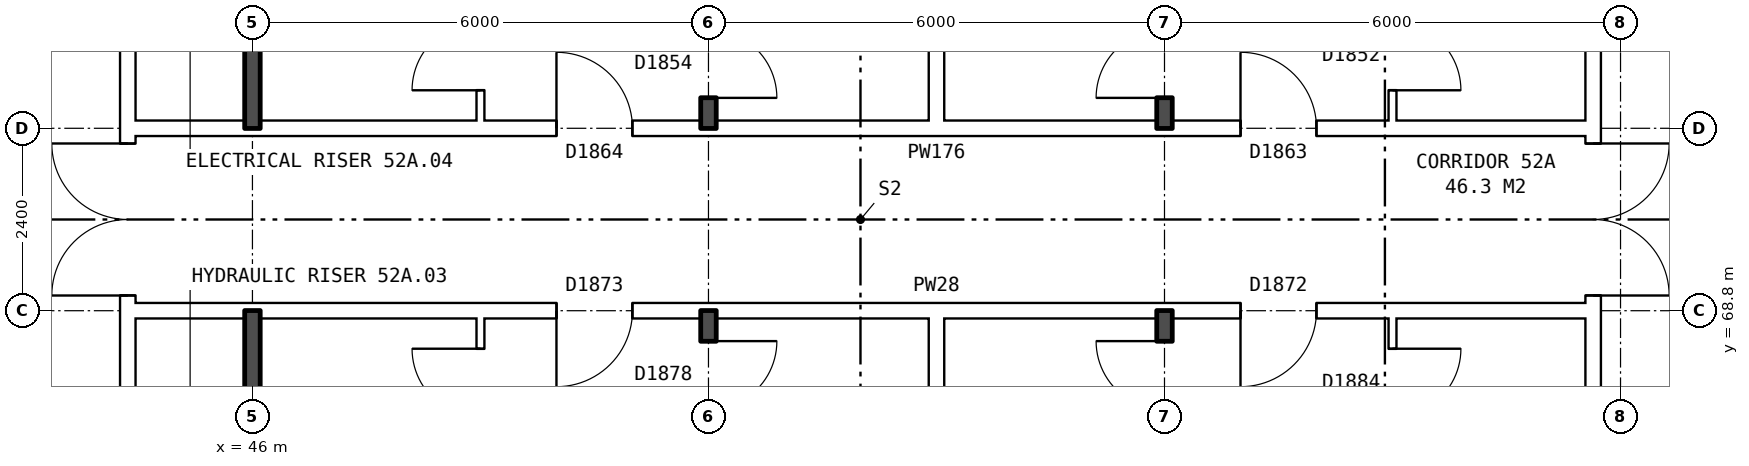
"""IFC4 building model, lengths in metres.
Left out: names, types, materials, properties, quantities, classifications, styles, units other than length and angle.
Written with IfcOpenShell. Run it as: python <this file> out.ifc"""

import sys

from ifc_helpers import new_model, si_unit, direction, frame, frame_2d, origin, place, context, subcontext, project, spatial, rectangle, extrude, element, fill, save


model = new_model("IFC4")
c1 = context("Model", 3, precision=1e-05, world=origin(), true_north=direction((0.0, 1.0)))
c2 = subcontext(c1, "Body", "Model", "MODEL_VIEW")
j1 = project(units=[si_unit("LENGTHUNIT", "METRE"), si_unit("PLANEANGLEUNIT", "RADIAN")], contexts=[c1])
p1 = place(None, origin())
s1 = spatial("IfcSite", under=j1, at=p1, CompositionType="ELEMENT")
p2 = place(p1, origin())
s2 = spatial("IfcBuilding", under=s1, at=p2, CompositionType="ELEMENT")
p3 = place(p2, frame((0.0, 0.0, 185.1)))
s3 = spatial("IfcBuildingStorey", under=s2, at=p3, CompositionType="ELEMENT", Elevation=185.1)
p4 = place(p3, frame((63.64, 63.9, 0.0), z_axis=(0.0, 0.0, 1.0), x_axis=(0.0, 1.0, 0.0)))
e1 = element("IfcWall", 1, at=p4, inside=s3, PredefinedType="PARTITIONING", context=c2, shape_type="SweptSolid", body=[
    extrude(rectangle(XDim=12.2, YDim=0.2, at=frame_2d((6.1, 0.0))), origin(), (0.0, 0.0, 1.0), 2.85),
])
p5 = place(p4, frame((5.1, 0.0, 0.0)))
e2 = element("IfcOpeningElement", 2, at=p5, cuts=e1, PredefinedType="OPENING", context=c2, shape_type="SweptSolid", body=[
    extrude(rectangle(XDim=2.0, YDim=2.1, at=frame_2d((1.0, 1.05))), frame((0.0, 0.11, 0.0), z_axis=(0.0, -1.0, 0.0), x_axis=(1.0, 0.0, 0.0)), (0.0, 0.0, 1.0), 0.22),
])
p6 = place(p3, frame((44.36, 63.9, 0.0), z_axis=(0.0, 0.0, 1.0), x_axis=(0.0, 1.0, 0.0)))
e3 = element("IfcWall", 3, at=p6, inside=s3, PredefinedType="PARTITIONING", context=c2, shape_type="SweptSolid", body=[
    extrude(rectangle(XDim=12.2, YDim=0.2, at=frame_2d((6.1, 0.0))), origin(), (0.0, 0.0, 1.0), 2.85),
])
p7 = place(p6, frame((5.1, 0.0, 0.0)))
e4 = element("IfcOpeningElement", 4, at=p7, cuts=e3, PredefinedType="OPENING", context=c2, shape_type="SweptSolid", body=[
    extrude(rectangle(XDim=2.0, YDim=2.1, at=frame_2d((1.0, 1.05))), frame((0.0, 0.11, 0.0), z_axis=(0.0, -1.0, 0.0), x_axis=(1.0, 0.0, 0.0)), (0.0, 0.0, 1.0), 0.22),
])
p8 = place(p3, frame((44.36, 68.8, 0.0), z_axis=(0.0, 0.0, 1.0), x_axis=(1.0, 0.0, 0.0)))
e5 = element("IfcWall", 5, at=p8, inside=s3, PredefinedType="PARTITIONING", context=c2, shape_type="SweptSolid", body=[
    extrude(rectangle(XDim=19.28, YDim=0.2, at=frame_2d((9.64, 0.0))), origin(), (0.0, 0.0, 1.0), 2.85),
])
p9 = place(p8, frame((14.64, 0.0, 0.0)))
e6 = element("IfcOpeningElement", 6, at=p9, cuts=e5, PredefinedType="OPENING", context=c2, shape_type="SweptSolid", body=[
    extrude(rectangle(XDim=1.0, YDim=2.1, at=frame_2d((0.5, 1.05))), frame((0.0, 0.11, 0.0), z_axis=(0.0, -1.0, 0.0), x_axis=(1.0, 0.0, 0.0)), (0.0, 0.0, 1.0), 0.22),
])
p10 = place(p8, frame((5.64, 0.0, 0.0)))
e7 = element("IfcOpeningElement", 7, at=p10, cuts=e5, PredefinedType="OPENING", context=c2, shape_type="SweptSolid", body=[
    extrude(rectangle(XDim=1.0, YDim=2.1, at=frame_2d((0.5, 1.05))), frame((0.0, 0.11, 0.0), z_axis=(0.0, -1.0, 0.0), x_axis=(1.0, 0.0, 0.0)), (0.0, 0.0, 1.0), 0.22),
])
p11 = place(p3, frame((44.36, 71.2, 0.0), z_axis=(0.0, 0.0, 1.0), x_axis=(1.0, 0.0, 0.0)))
e8 = element("IfcWall", 8, at=p11, inside=s3, PredefinedType="PARTITIONING", context=c2, shape_type="SweptSolid", body=[
    extrude(rectangle(XDim=19.28, YDim=0.2, at=frame_2d((9.64, 0.0))), origin(), (0.0, 0.0, 1.0), 2.85),
])
p12 = place(p11, frame((14.64, 0.0, 0.0)))
e9 = element("IfcOpeningElement", 9, at=p12, cuts=e8, PredefinedType="OPENING", context=c2, shape_type="SweptSolid", body=[
    extrude(rectangle(XDim=1.0, YDim=2.1, at=frame_2d((0.5, 1.05))), frame((0.0, 0.11, 0.0), z_axis=(0.0, -1.0, 0.0), x_axis=(1.0, 0.0, 0.0)), (0.0, 0.0, 1.0), 0.22),
])
p13 = place(p11, frame((5.64, 0.0, 0.0)))
e10 = element("IfcOpeningElement", 10, at=p13, cuts=e8, PredefinedType="OPENING", context=c2, shape_type="SweptSolid", body=[
    extrude(rectangle(XDim=1.0, YDim=2.1, at=frame_2d((0.5, 1.05))), frame((0.0, 0.11, 0.0), z_axis=(0.0, -1.0, 0.0), x_axis=(1.0, 0.0, 0.0)), (0.0, 0.0, 1.0), 0.22),
])
for number, where, z_axis, x_axis in (
    (11, (46.0, 63.8, 0.0), (0.0, 0.0, 1.0), (0.0, 1.0, 0.0)),
    (12, (46.0, 71.2, 0.0), (0.0, 0.0, 1.0), (0.0, 1.0, 0.0)),
):
    element("IfcWall", number, at=place(p3, frame(where, z_axis=z_axis, x_axis=x_axis)), inside=s3, PredefinedType="SOLIDWALL", context=c2, shape_type="SweptSolid", body=[
        extrude(rectangle(XDim=5.0, YDim=0.2, at=frame_2d((2.5, 0.0))), origin(), (0.0, 0.0, 1.0), 2.85),
    ])
p14 = place(p3, frame((49.0, 54.36, 0.0), z_axis=(0.0, 0.0, 1.0), x_axis=(0.0, 1.0, 0.0)))
e13 = element("IfcWall", 13, at=p14, inside=s3, PredefinedType="PARTITIONING", context=c2, shape_type="SweptSolid", body=[
    extrude(rectangle(XDim=14.34, YDim=0.1, at=frame_2d((7.17, 0.0))), origin(), (0.0, 0.0, 1.0), 2.85),
])
p15 = place(p14, frame((5.5, 0.0, 0.0)))
e14 = element("IfcOpeningElement", 14, at=p15, cuts=e13, PredefinedType="OPENING", context=c2, shape_type="SweptSolid", body=[
    extrude(rectangle(XDim=0.9, YDim=2.1, at=frame_2d((0.45, 1.05))), frame((0.0, 0.06, 0.0), z_axis=(0.0, -1.0, 0.0), x_axis=(1.0, 0.0, 0.0)), (0.0, 0.0, 1.0), 0.12),
])
p16 = place(p14, frame((13.04, 0.0, 0.0)))
e15 = element("IfcOpeningElement", 15, at=p16, cuts=e13, PredefinedType="OPENING", context=c2, shape_type="SweptSolid", body=[
    extrude(rectangle(XDim=0.9, YDim=2.1, at=frame_2d((0.45, 1.05))), frame((0.0, 0.06, 0.0), z_axis=(0.0, -1.0, 0.0), x_axis=(1.0, 0.0, 0.0)), (0.0, 0.0, 1.0), 0.12),
])
p17 = place(p3, frame((49.0, 71.3, 0.0), z_axis=(0.0, 0.0, 1.0), x_axis=(0.0, 1.0, 0.0)))
e16 = element("IfcWall", 16, at=p17, inside=s3, PredefinedType="PARTITIONING", context=c2, shape_type="SweptSolid", body=[
    extrude(rectangle(XDim=14.34, YDim=0.1, at=frame_2d((7.17, 0.0))), origin(), (0.0, 0.0, 1.0), 2.85),
])
p18 = place(p17, frame((5.74, 0.0, 0.0)))
e17 = element("IfcOpeningElement", 17, at=p18, cuts=e16, PredefinedType="OPENING", context=c2, shape_type="SweptSolid", body=[
    extrude(rectangle(XDim=0.9, YDim=2.1, at=frame_2d((0.45, 1.05))), frame((0.0, 0.06, 0.0), z_axis=(0.0, -1.0, 0.0), x_axis=(1.0, 0.0, 0.0)), (0.0, 0.0, 1.0), 0.12),
])
p19 = place(p17, frame((0.4, 0.0, 0.0)))
e18 = element("IfcOpeningElement", 18, at=p19, cuts=e16, PredefinedType="OPENING", context=c2, shape_type="SweptSolid", body=[
    extrude(rectangle(XDim=0.9, YDim=2.1, at=frame_2d((0.45, 1.05))), frame((0.0, 0.06, 0.0), z_axis=(0.0, -1.0, 0.0), x_axis=(1.0, 0.0, 0.0)), (0.0, 0.0, 1.0), 0.12),
])
p20 = place(p3, frame((52.0, 54.36, 0.0), z_axis=(0.0, 0.0, 1.0), x_axis=(0.0, 1.0, 0.0)))
e19 = element("IfcWall", 19, at=p20, inside=s3, PredefinedType="SOLIDWALL", context=c2, shape_type="SweptSolid", body=[
    extrude(rectangle(XDim=14.44, YDim=0.2, at=frame_2d((7.22, 0.0))), origin(), (0.0, 0.0, 1.0), 2.85),
])
p21 = place(p20, frame((5.5, 0.0, 0.0)))
e20 = element("IfcOpeningElement", 20, at=p21, cuts=e19, PredefinedType="OPENING", context=c2, shape_type="SweptSolid", body=[
    extrude(rectangle(XDim=0.9, YDim=2.1, at=frame_2d((0.45, 1.05))), frame((0.0, 0.11, 0.0), z_axis=(0.0, -1.0, 0.0), x_axis=(1.0, 0.0, 0.0)), (0.0, 0.0, 1.0), 0.22),
])
p22 = place(p20, frame((13.14, 0.0, 0.0)))
e21 = element("IfcOpeningElement", 21, at=p22, cuts=e19, PredefinedType="OPENING", context=c2, shape_type="SweptSolid", body=[
    extrude(rectangle(XDim=0.9, YDim=2.1, at=frame_2d((0.45, 1.05))), frame((0.0, 0.11, 0.0), z_axis=(0.0, -1.0, 0.0), x_axis=(1.0, 0.0, 0.0)), (0.0, 0.0, 1.0), 0.22),
])
p23 = place(p3, frame((52.0, 71.2, 0.0), z_axis=(0.0, 0.0, 1.0), x_axis=(0.0, 1.0, 0.0)))
e22 = element("IfcWall", 22, at=p23, inside=s3, PredefinedType="SOLIDWALL", context=c2, shape_type="SweptSolid", body=[
    extrude(rectangle(XDim=14.44, YDim=0.2, at=frame_2d((7.22, 0.0))), origin(), (0.0, 0.0, 1.0), 2.85),
])
p24 = place(p23, frame((5.84, 0.0, 0.0)))
e23 = element("IfcOpeningElement", 23, at=p24, cuts=e22, PredefinedType="OPENING", context=c2, shape_type="SweptSolid", body=[
    extrude(rectangle(XDim=0.9, YDim=2.1, at=frame_2d((0.45, 1.05))), frame((0.0, 0.11, 0.0), z_axis=(0.0, -1.0, 0.0), x_axis=(1.0, 0.0, 0.0)), (0.0, 0.0, 1.0), 0.22),
])
p25 = place(p23, frame((0.4, 0.0, 0.0)))
e24 = element("IfcOpeningElement", 24, at=p25, cuts=e22, PredefinedType="OPENING", context=c2, shape_type="SweptSolid", body=[
    extrude(rectangle(XDim=0.9, YDim=2.1, at=frame_2d((0.45, 1.05))), frame((0.0, 0.11, 0.0), z_axis=(0.0, -1.0, 0.0), x_axis=(1.0, 0.0, 0.0)), (0.0, 0.0, 1.0), 0.22),
])
for number, where, z_axis, x_axis in (
    (25, (55.0, 54.36, 0.0), (0.0, 0.0, 1.0), (0.0, 1.0, 0.0)),
    (26, (55.0, 71.3, 0.0), (0.0, 0.0, 1.0), (0.0, 1.0, 0.0)),
):
    element("IfcWall", number, at=place(p3, frame(where, z_axis=z_axis, x_axis=x_axis)), inside=s3, PredefinedType="PARTITIONING", context=c2, shape_type="SweptSolid", body=[
        extrude(rectangle(XDim=14.34, YDim=0.2, at=frame_2d((7.17, 0.0))), origin(), (0.0, 0.0, 1.0), 2.85),
    ])
p26 = place(p3, frame((58.0, 54.36, 0.0), z_axis=(0.0, 0.0, 1.0), x_axis=(0.0, 1.0, 0.0)))
e27 = element("IfcWall", 27, at=p26, inside=s3, PredefinedType="SOLIDWALL", context=c2, shape_type="SweptSolid", body=[
    extrude(rectangle(XDim=14.44, YDim=0.2, at=frame_2d((7.22, 0.0))), origin(), (0.0, 0.0, 1.0), 2.85),
])
p27 = place(p26, frame((5.5, 0.0, 0.0)))
e28 = element("IfcOpeningElement", 28, at=p27, cuts=e27, PredefinedType="OPENING", context=c2, shape_type="SweptSolid", body=[
    extrude(rectangle(XDim=0.9, YDim=2.1, at=frame_2d((0.45, 1.05))), frame((0.0, 0.11, 0.0), z_axis=(0.0, -1.0, 0.0), x_axis=(1.0, 0.0, 0.0)), (0.0, 0.0, 1.0), 0.22),
])
p28 = place(p26, frame((13.14, 0.0, 0.0)))
e29 = element("IfcOpeningElement", 29, at=p28, cuts=e27, PredefinedType="OPENING", context=c2, shape_type="SweptSolid", body=[
    extrude(rectangle(XDim=0.9, YDim=2.1, at=frame_2d((0.45, 1.05))), frame((0.0, 0.11, 0.0), z_axis=(0.0, -1.0, 0.0), x_axis=(1.0, 0.0, 0.0)), (0.0, 0.0, 1.0), 0.22),
])
p29 = place(p3, frame((58.0, 71.2, 0.0), z_axis=(0.0, 0.0, 1.0), x_axis=(0.0, 1.0, 0.0)))
e30 = element("IfcWall", 30, at=p29, inside=s3, PredefinedType="SOLIDWALL", context=c2, shape_type="SweptSolid", body=[
    extrude(rectangle(XDim=14.44, YDim=0.2, at=frame_2d((7.22, 0.0))), origin(), (0.0, 0.0, 1.0), 2.85),
])
p30 = place(p29, frame((9.34, 0.0, 0.0)))
e31 = element("IfcOpeningElement", 31, at=p30, cuts=e30, PredefinedType="OPENING", context=c2, shape_type="SweptSolid", body=[
    extrude(rectangle(XDim=0.9, YDim=2.1, at=frame_2d((0.45, 1.05))), frame((0.0, 0.11, 0.0), z_axis=(0.0, -1.0, 0.0), x_axis=(1.0, 0.0, 0.0)), (0.0, 0.0, 1.0), 0.22),
])
p31 = place(p29, frame((0.4, 0.0, 0.0)))
e32 = element("IfcOpeningElement", 32, at=p31, cuts=e30, PredefinedType="OPENING", context=c2, shape_type="SweptSolid", body=[
    extrude(rectangle(XDim=0.9, YDim=2.1, at=frame_2d((0.45, 1.05))), frame((0.0, 0.11, 0.0), z_axis=(0.0, -1.0, 0.0), x_axis=(1.0, 0.0, 0.0)), (0.0, 0.0, 1.0), 0.22),
])
p32 = place(p3, frame((61.0, 54.36, 0.0), z_axis=(0.0, 0.0, 1.0), x_axis=(0.0, 1.0, 0.0)))
e33 = element("IfcWall", 33, at=p32, inside=s3, PredefinedType="PARTITIONING", context=c2, shape_type="SweptSolid", body=[
    extrude(rectangle(XDim=14.34, YDim=0.1, at=frame_2d((7.17, 0.0))), origin(), (0.0, 0.0, 1.0), 2.85),
])
p33 = place(p32, frame((5.5, 0.0, 0.0)))
e34 = element("IfcOpeningElement", 34, at=p33, cuts=e33, PredefinedType="OPENING", context=c2, shape_type="SweptSolid", body=[
    extrude(rectangle(XDim=0.9, YDim=2.1, at=frame_2d((0.45, 1.05))), frame((0.0, 0.06, 0.0), z_axis=(0.0, -1.0, 0.0), x_axis=(1.0, 0.0, 0.0)), (0.0, 0.0, 1.0), 0.12),
])
p34 = place(p32, frame((13.04, 0.0, 0.0)))
e35 = element("IfcOpeningElement", 35, at=p34, cuts=e33, PredefinedType="OPENING", context=c2, shape_type="SweptSolid", body=[
    extrude(rectangle(XDim=0.9, YDim=2.1, at=frame_2d((0.45, 1.05))), frame((0.0, 0.06, 0.0), z_axis=(0.0, -1.0, 0.0), x_axis=(1.0, 0.0, 0.0)), (0.0, 0.0, 1.0), 0.12),
])
p35 = place(p3, frame((61.0, 71.3, 0.0), z_axis=(0.0, 0.0, 1.0), x_axis=(0.0, 1.0, 0.0)))
e36 = element("IfcWall", 36, at=p35, inside=s3, PredefinedType="PARTITIONING", context=c2, shape_type="SweptSolid", body=[
    extrude(rectangle(XDim=14.34, YDim=0.1, at=frame_2d((7.17, 0.0))), origin(), (0.0, 0.0, 1.0), 2.85),
])
p36 = place(p35, frame((9.24, 0.0, 0.0)))
e37 = element("IfcOpeningElement", 37, at=p36, cuts=e36, PredefinedType="OPENING", context=c2, shape_type="SweptSolid", body=[
    extrude(rectangle(XDim=0.9, YDim=2.1, at=frame_2d((0.45, 1.05))), frame((0.0, 0.06, 0.0), z_axis=(0.0, -1.0, 0.0), x_axis=(1.0, 0.0, 0.0)), (0.0, 0.0, 1.0), 0.12),
])
p37 = place(p35, frame((0.4, 0.0, 0.0)))
e38 = element("IfcOpeningElement", 38, at=p37, cuts=e36, PredefinedType="OPENING", context=c2, shape_type="SweptSolid", body=[
    extrude(rectangle(XDim=0.9, YDim=2.1, at=frame_2d((0.45, 1.05))), frame((0.0, 0.06, 0.0), z_axis=(0.0, -1.0, 0.0), x_axis=(1.0, 0.0, 0.0)), (0.0, 0.0, 1.0), 0.12),
])
p38 = place(p5, frame((2.0, 0.0, 0.0), z_axis=(0.0, 0.0, 1.0), x_axis=(-1.0, 0.0, 0.0)))
e39 = element("IfcDoor", 39, at=p38, inside=s3, OperationType="DOUBLE_DOOR_SINGLE_SWING", PredefinedType="DOOR", context=c2, shape_type="SweptSolid", body=[
    extrude(rectangle(XDim=2.0, YDim=2.1, at=frame_2d((1.0, 1.05))), frame((0.0, 0.025, 0.0), z_axis=(0.0, -1.0, 0.0), x_axis=(1.0, 0.0, 0.0)), (0.0, 0.0, 1.0), 0.05),
])
fill(e2, e39)
p39 = place(p7, origin())
e40 = element("IfcDoor", 40, at=p39, inside=s3, OperationType="DOUBLE_DOOR_SINGLE_SWING", PredefinedType="DOOR", context=c2, shape_type="SweptSolid", body=[
    extrude(rectangle(XDim=2.0, YDim=2.1, at=frame_2d((1.0, 1.05))), frame((0.0, 0.025, 0.0), z_axis=(0.0, -1.0, 0.0), x_axis=(1.0, 0.0, 0.0)), (0.0, 0.0, 1.0), 0.05),
])
fill(e4, e40)
p40 = place(p9, frame((1.0, 0.0, 0.0), z_axis=(0.0, 0.0, 1.0), x_axis=(-1.0, 0.0, 0.0)))
e41 = element("IfcDoor", 41, at=p40, inside=s3, OperationType="SINGLE_SWING_RIGHT", PredefinedType="DOOR", context=c2, shape_type="SweptSolid", body=[
    extrude(rectangle(XDim=1.0, YDim=2.1, at=frame_2d((0.5, 1.05))), frame((0.0, 0.025, 0.0), z_axis=(0.0, -1.0, 0.0), x_axis=(1.0, 0.0, 0.0)), (0.0, 0.0, 1.0), 0.05),
])
fill(e6, e41)
p41 = place(p34, frame((0.9, 0.0, 0.0), z_axis=(0.0, 0.0, 1.0), x_axis=(-1.0, 0.0, 0.0)))
e42 = element("IfcDoor", 42, at=p41, inside=s3, OperationType="SINGLE_SWING_LEFT", PredefinedType="DOOR", context=c2, shape_type="SweptSolid", body=[
    extrude(rectangle(XDim=0.9, YDim=2.1, at=frame_2d((0.45, 1.05))), frame((0.0, 0.025, 0.0), z_axis=(0.0, -1.0, 0.0), x_axis=(1.0, 0.0, 0.0)), (0.0, 0.0, 1.0), 0.05),
])
fill(e35, e42)
p42 = place(p28, origin())
e43 = element("IfcDoor", 43, at=p42, inside=s3, OperationType="SINGLE_SWING_RIGHT", PredefinedType="DOOR", context=c2, shape_type="SweptSolid", body=[
    extrude(rectangle(XDim=0.9, YDim=2.1, at=frame_2d((0.45, 1.05))), frame((0.0, 0.025, 0.0), z_axis=(0.0, -1.0, 0.0), x_axis=(1.0, 0.0, 0.0)), (0.0, 0.0, 1.0), 0.05),
])
fill(e29, e43)
p43 = place(p10, frame((1.0, 0.0, 0.0), z_axis=(0.0, 0.0, 1.0), x_axis=(-1.0, 0.0, 0.0)))
e44 = element("IfcDoor", 44, at=p43, inside=s3, OperationType="SINGLE_SWING_RIGHT", PredefinedType="DOOR", context=c2, shape_type="SweptSolid", body=[
    extrude(rectangle(XDim=1.0, YDim=2.1, at=frame_2d((0.5, 1.05))), frame((0.0, 0.025, 0.0), z_axis=(0.0, -1.0, 0.0), x_axis=(1.0, 0.0, 0.0)), (0.0, 0.0, 1.0), 0.05),
])
fill(e7, e44)
p44 = place(p22, frame((0.9, 0.0, 0.0), z_axis=(0.0, 0.0, 1.0), x_axis=(-1.0, 0.0, 0.0)))
e45 = element("IfcDoor", 45, at=p44, inside=s3, OperationType="SINGLE_SWING_LEFT", PredefinedType="DOOR", context=c2, shape_type="SweptSolid", body=[
    extrude(rectangle(XDim=0.9, YDim=2.1, at=frame_2d((0.45, 1.05))), frame((0.0, 0.025, 0.0), z_axis=(0.0, -1.0, 0.0), x_axis=(1.0, 0.0, 0.0)), (0.0, 0.0, 1.0), 0.05),
])
fill(e21, e45)
p45 = place(p16, origin())
e46 = element("IfcDoor", 46, at=p45, inside=s3, OperationType="SINGLE_SWING_RIGHT", PredefinedType="DOOR", context=c2, shape_type="SweptSolid", body=[
    extrude(rectangle(XDim=0.9, YDim=2.1, at=frame_2d((0.45, 1.05))), frame((0.0, 0.025, 0.0), z_axis=(0.0, -1.0, 0.0), x_axis=(1.0, 0.0, 0.0)), (0.0, 0.0, 1.0), 0.05),
])
fill(e15, e46)
p46 = place(p12, origin())
e47 = element("IfcDoor", 47, at=p46, inside=s3, OperationType="SINGLE_SWING_LEFT", PredefinedType="DOOR", context=c2, shape_type="SweptSolid", body=[
    extrude(rectangle(XDim=1.0, YDim=2.1, at=frame_2d((0.5, 1.05))), frame((0.0, 0.025, 0.0), z_axis=(0.0, -1.0, 0.0), x_axis=(1.0, 0.0, 0.0)), (0.0, 0.0, 1.0), 0.05),
])
fill(e9, e47)
p47 = place(p37, frame((0.9, 0.0, 0.0), z_axis=(0.0, 0.0, 1.0), x_axis=(-1.0, 0.0, 0.0)))
e48 = element("IfcDoor", 48, at=p47, inside=s3, OperationType="SINGLE_SWING_RIGHT", PredefinedType="DOOR", context=c2, shape_type="SweptSolid", body=[
    extrude(rectangle(XDim=0.9, YDim=2.1, at=frame_2d((0.45, 1.05))), frame((0.0, 0.025, 0.0), z_axis=(0.0, -1.0, 0.0), x_axis=(1.0, 0.0, 0.0)), (0.0, 0.0, 1.0), 0.05),
])
fill(e38, e48)
p48 = place(p31, origin())
e49 = element("IfcDoor", 49, at=p48, inside=s3, OperationType="SINGLE_SWING_LEFT", PredefinedType="DOOR", context=c2, shape_type="SweptSolid", body=[
    extrude(rectangle(XDim=0.9, YDim=2.1, at=frame_2d((0.45, 1.05))), frame((0.0, 0.025, 0.0), z_axis=(0.0, -1.0, 0.0), x_axis=(1.0, 0.0, 0.0)), (0.0, 0.0, 1.0), 0.05),
])
fill(e32, e49)
p49 = place(p13, origin())
e50 = element("IfcDoor", 50, at=p49, inside=s3, OperationType="SINGLE_SWING_LEFT", PredefinedType="DOOR", context=c2, shape_type="SweptSolid", body=[
    extrude(rectangle(XDim=1.0, YDim=2.1, at=frame_2d((0.5, 1.05))), frame((0.0, 0.025, 0.0), z_axis=(0.0, -1.0, 0.0), x_axis=(1.0, 0.0, 0.0)), (0.0, 0.0, 1.0), 0.05),
])
fill(e10, e50)
p50 = place(p25, frame((0.9, 0.0, 0.0), z_axis=(0.0, 0.0, 1.0), x_axis=(-1.0, 0.0, 0.0)))
e51 = element("IfcDoor", 51, at=p50, inside=s3, OperationType="SINGLE_SWING_RIGHT", PredefinedType="DOOR", context=c2, shape_type="SweptSolid", body=[
    extrude(rectangle(XDim=0.9, YDim=2.1, at=frame_2d((0.45, 1.05))), frame((0.0, 0.025, 0.0), z_axis=(0.0, -1.0, 0.0), x_axis=(1.0, 0.0, 0.0)), (0.0, 0.0, 1.0), 0.05),
])
fill(e24, e51)
p51 = place(p19, origin())
e52 = element("IfcDoor", 52, at=p51, inside=s3, OperationType="SINGLE_SWING_LEFT", PredefinedType="DOOR", context=c2, shape_type="SweptSolid", body=[
    extrude(rectangle(XDim=0.9, YDim=2.1, at=frame_2d((0.45, 1.05))), frame((0.0, 0.025, 0.0), z_axis=(0.0, -1.0, 0.0), x_axis=(1.0, 0.0, 0.0)), (0.0, 0.0, 1.0), 0.05),
])
fill(e18, e52)
save(model, sys.argv[1])
